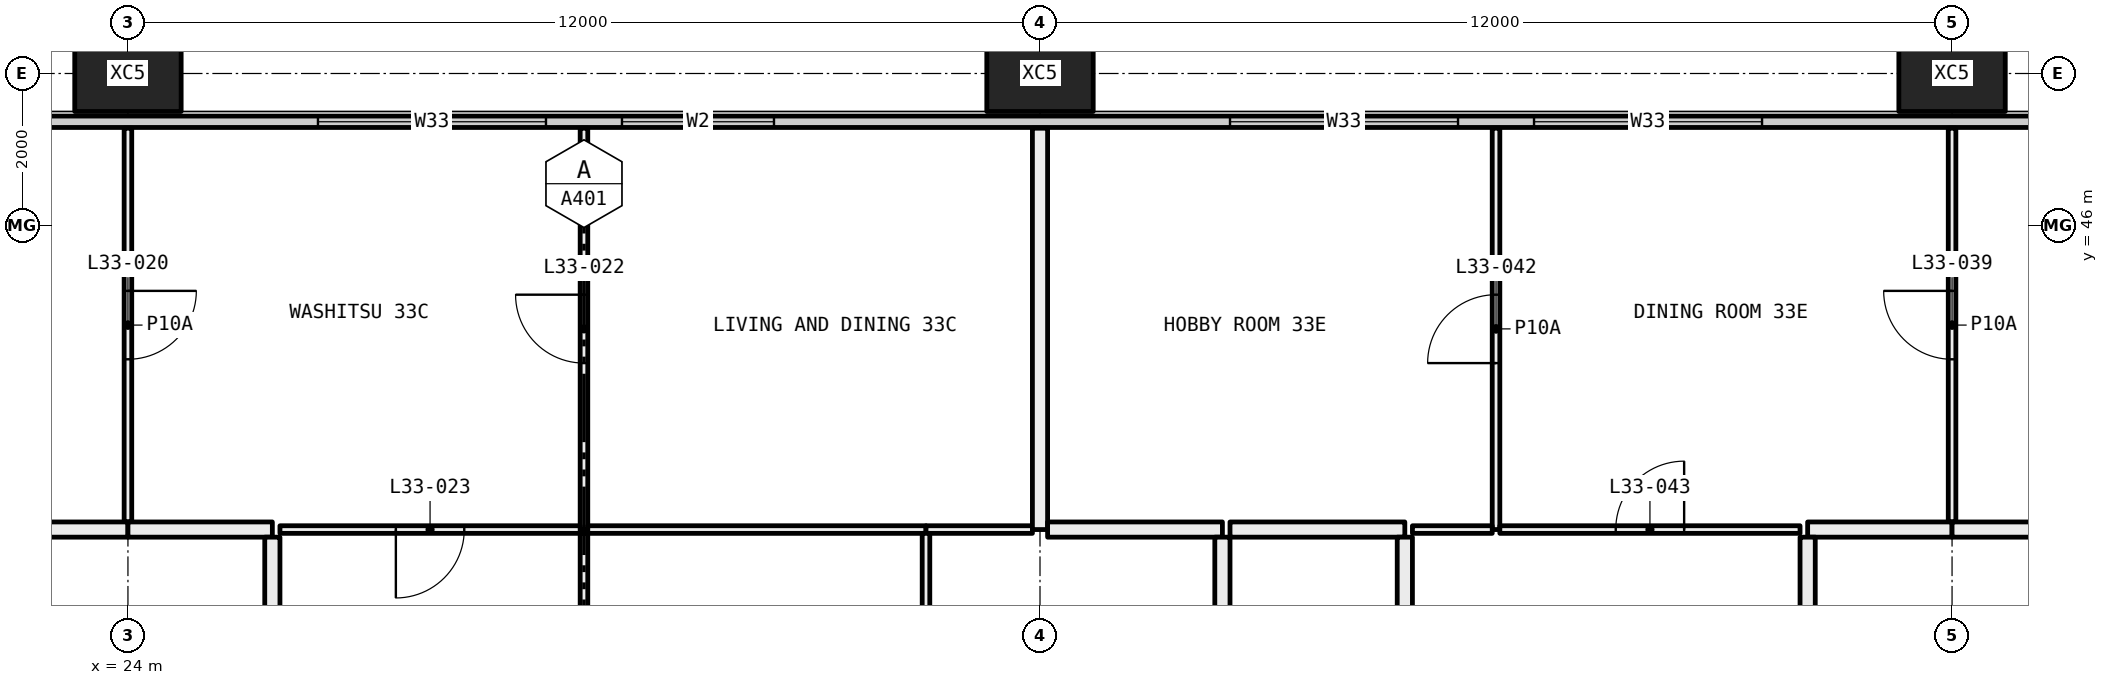
"""IFC4 building model, lengths in metres.
Left out: names, types, materials, properties, quantities, classifications, styles, units other than length and angle.
Written with IfcOpenShell. Run it as: python <this file> out.ifc"""

import sys

from ifc_helpers import new_model, si_unit, direction, frame, frame_2d, origin, origin_2d, place, context, subcontext, project, spatial, rectangle, hollow_rectangle, extrude, element, fill, save


model = new_model("IFC4")
c1 = context("Model", 3, precision=1e-05, world=origin(), true_north=direction((0.0, 1.0)))
c2 = subcontext(c1, "Body", "Model", "MODEL_VIEW")
j1 = project(units=[si_unit("LENGTHUNIT", "METRE"), si_unit("PLANEANGLEUNIT", "RADIAN")], contexts=[c1])
p1 = place(None, origin())
s1 = spatial("IfcSite", under=j1, at=p1, CompositionType="ELEMENT")
p2 = place(p1, origin())
s2 = spatial("IfcBuilding", under=s1, at=p2, CompositionType="ELEMENT")
p3 = place(p2, frame((0.0, 0.0, 127.65)))
s3 = spatial("IfcBuildingStorey", under=s2, at=p3, CompositionType="ELEMENT", Elevation=127.65)
for number, where, z_axis, x_axis in (
    (1, (24.0, 48.0, -0.4), (0.0, 0.0, 1.0), (1.0, 0.0, 0.0)),
    (2, (36.0, 48.0, -0.4), (0.0, 0.0, 1.0), (1.0, 0.0, 0.0)),
    (3, (48.0, 48.0, -0.4), (0.0, 0.0, 1.0), (1.0, 0.0, 0.0)),
):
    element("IfcColumn", number, at=place(p3, frame(where, z_axis=z_axis, x_axis=x_axis)), inside=s3, PredefinedType="COLUMN", context=c2, shape_type="SweptSolid", body=[
        extrude(hollow_rectangle(XDim=1.4, YDim=1.0, WallThickness=0.055, at=origin_2d()), origin(), (0.0, 0.0, 1.0), 3.45),
    ])
p4 = place(p3, frame((6.56, 47.365, 0.0), z_axis=(0.0, 0.0, 1.0), x_axis=(1.0, 0.0, 0.0)))
e4 = element("IfcWall", 4, at=p4, inside=s3, PredefinedType="ELEMENTEDWALL", context=c2, shape_type="SweptSolid", body=[
    extrude(rectangle(XDim=58.88, YDim=0.15, at=frame_2d((29.44, 0.0))), origin(), (0.0, 0.0, 1.0), 3.05),
])
p5 = place(p4, frame((0.44, 0.0, 0.45)))
e5 = element("IfcOpeningElement", 5, at=p5, cuts=e4, PredefinedType="OPENING", context=c2, shape_type="SweptSolid", body=[
    extrude(rectangle(XDim=4.5, YDim=2.55, at=frame_2d((2.25, 1.275))), frame((0.0, 0.085, 0.0), z_axis=(0.0, -1.0, 0.0), x_axis=(1.0, 0.0, 0.0)), (0.0, 0.0, 1.0), 0.17),
])
p6 = place(p4, frame((7.94, 0.0, 0.45)))
e6 = element("IfcOpeningElement", 6, at=p6, cuts=e4, PredefinedType="OPENING", context=c2, shape_type="SweptSolid", body=[
    extrude(rectangle(XDim=3.0, YDim=2.55, at=frame_2d((1.5, 1.275))), frame((0.0, 0.085, 0.0), z_axis=(0.0, -1.0, 0.0), x_axis=(1.0, 0.0, 0.0)), (0.0, 0.0, 1.0), 0.17),
])
p7 = place(p4, frame((11.94, 0.0, 0.45)))
e7 = element("IfcOpeningElement", 7, at=p7, cuts=e4, PredefinedType="OPENING", context=c2, shape_type="SweptSolid", body=[
    extrude(rectangle(XDim=3.0, YDim=2.55, at=frame_2d((1.5, 1.275))), frame((0.0, 0.085, 0.0), z_axis=(0.0, -1.0, 0.0), x_axis=(1.0, 0.0, 0.0)), (0.0, 0.0, 1.0), 0.17),
])
p8 = place(p4, frame((19.94, 0.0, 0.45)))
e8 = element("IfcOpeningElement", 8, at=p8, cuts=e4, PredefinedType="OPENING", context=c2, shape_type="SweptSolid", body=[
    extrude(rectangle(XDim=3.0, YDim=2.55, at=frame_2d((1.5, 1.275))), frame((0.0, 0.085, 0.0), z_axis=(0.0, -1.0, 0.0), x_axis=(1.0, 0.0, 0.0)), (0.0, 0.0, 1.0), 0.17),
])
p9 = place(p4, frame((23.94, 0.0, 0.45)))
e9 = element("IfcOpeningElement", 9, at=p9, cuts=e4, PredefinedType="OPENING", context=c2, shape_type="SweptSolid", body=[
    extrude(rectangle(XDim=2.0, YDim=2.55, at=frame_2d((1.0, 1.275))), frame((0.0, 0.085, 0.0), z_axis=(0.0, -1.0, 0.0), x_axis=(1.0, 0.0, 0.0)), (0.0, 0.0, 1.0), 0.17),
])
p10 = place(p4, frame((31.94, 0.0, 0.45)))
e10 = element("IfcOpeningElement", 10, at=p10, cuts=e4, PredefinedType="OPENING", context=c2, shape_type="SweptSolid", body=[
    extrude(rectangle(XDim=3.0, YDim=2.55, at=frame_2d((1.5, 1.275))), frame((0.0, 0.085, 0.0), z_axis=(0.0, -1.0, 0.0), x_axis=(1.0, 0.0, 0.0)), (0.0, 0.0, 1.0), 0.17),
])
p11 = place(p4, frame((35.94, 0.0, 0.45)))
e11 = element("IfcOpeningElement", 11, at=p11, cuts=e4, PredefinedType="OPENING", context=c2, shape_type="SweptSolid", body=[
    extrude(rectangle(XDim=3.0, YDim=2.55, at=frame_2d((1.5, 1.275))), frame((0.0, 0.085, 0.0), z_axis=(0.0, -1.0, 0.0), x_axis=(1.0, 0.0, 0.0)), (0.0, 0.0, 1.0), 0.17),
])
p12 = place(p4, frame((43.94, 0.0, 0.45)))
e12 = element("IfcOpeningElement", 12, at=p12, cuts=e4, PredefinedType="OPENING", context=c2, shape_type="SweptSolid", body=[
    extrude(rectangle(XDim=3.0, YDim=2.55, at=frame_2d((1.5, 1.275))), frame((0.0, 0.085, 0.0), z_axis=(0.0, -1.0, 0.0), x_axis=(1.0, 0.0, 0.0)), (0.0, 0.0, 1.0), 0.17),
])
p13 = place(p4, frame((47.94, 0.0, 0.45)))
e13 = element("IfcOpeningElement", 13, at=p13, cuts=e4, PredefinedType="OPENING", context=c2, shape_type="SweptSolid", body=[
    extrude(rectangle(XDim=2.0, YDim=2.55, at=frame_2d((1.0, 1.275))), frame((0.0, 0.085, 0.0), z_axis=(0.0, -1.0, 0.0), x_axis=(1.0, 0.0, 0.0)), (0.0, 0.0, 1.0), 0.17),
])
p14 = place(p4, frame((53.94, 0.0, 0.45)))
e14 = element("IfcOpeningElement", 14, at=p14, cuts=e4, PredefinedType="OPENING", context=c2, shape_type="SweptSolid", body=[
    extrude(rectangle(XDim=4.5, YDim=2.55, at=frame_2d((2.25, 1.275))), frame((0.0, 0.085, 0.0), z_axis=(0.0, -1.0, 0.0), x_axis=(1.0, 0.0, 0.0)), (0.0, 0.0, 1.0), 0.17),
])
p15 = place(p3, frame((24.0, 42.1, 0.0), z_axis=(0.0, 0.0, 1.0), x_axis=(0.0, 1.0, 0.0)))
e15 = element("IfcWall", 15, at=p15, inside=s3, PredefinedType="PARTITIONING", context=c2, shape_type="SweptSolid", body=[
    extrude(rectangle(XDim=5.18, YDim=0.1, at=frame_2d((2.59, 0.0))), origin(), (0.0, 0.0, 1.0), 3.05),
])
p16 = place(p15, frame((2.14, 0.0, 0.0)))
e16 = element("IfcOpeningElement", 16, at=p16, cuts=e15, PredefinedType="OPENING", context=c2, shape_type="SweptSolid", body=[
    extrude(rectangle(XDim=0.9, YDim=2.1, at=frame_2d((0.45, 1.05))), frame((0.0, 0.06, 0.0), z_axis=(0.0, -1.0, 0.0), x_axis=(1.0, 0.0, 0.0)), (0.0, 0.0, 1.0), 0.12),
])
p17 = place(p3, frame((18.0, 42.0, 0.0), z_axis=(0.0, 0.0, 1.0), x_axis=(1.0, 0.0, 0.0)))
e17 = element("IfcWall", 17, at=p17, inside=s3, PredefinedType="PARTITIONING", context=c2, shape_type="SweptSolid", body=[
    extrude(rectangle(XDim=6.0, YDim=0.2, at=frame_2d((3.0, 0.0))), origin(), (0.0, 0.0, 1.0), 3.05),
])
p18 = place(p17, frame((2.5, 0.0, 0.0)))
e18 = element("IfcOpeningElement", 18, at=p18, cuts=e17, PredefinedType="OPENING", context=c2, shape_type="SweptSolid", body=[
    extrude(rectangle(XDim=1.0, YDim=2.1, at=frame_2d((0.5, 1.05))), frame((0.0, 0.11, 0.0), z_axis=(0.0, -1.0, 0.0), x_axis=(1.0, 0.0, 0.0)), (0.0, 0.0, 1.0), 0.22),
])
p19 = place(p3, frame((30.0, 42.0, 0.0), z_axis=(0.0, 0.0, 1.0), x_axis=(0.0, 1.0, 0.0)))
e19 = element("IfcWall", 19, at=p19, inside=s3, PredefinedType="PARTITIONING", context=c2, shape_type="SweptSolid", body=[
    extrude(rectangle(XDim=5.28, YDim=0.1, at=frame_2d((2.64, 0.0))), origin(), (0.0, 0.0, 1.0), 3.05),
])
p20 = place(p19, frame((2.19, 0.0, 0.0)))
e20 = element("IfcOpeningElement", 20, at=p20, cuts=e19, PredefinedType="OPENING", context=c2, shape_type="SweptSolid", body=[
    extrude(rectangle(XDim=0.9, YDim=2.1, at=frame_2d((0.45, 1.05))), frame((0.0, 0.06, 0.0), z_axis=(0.0, -1.0, 0.0), x_axis=(1.0, 0.0, 0.0)), (0.0, 0.0, 1.0), 0.12),
])
p21 = place(p3, frame((26.0, 42.0, 0.0), z_axis=(0.0, 0.0, 1.0), x_axis=(1.0, 0.0, 0.0)))
e21 = element("IfcWall", 21, at=p21, inside=s3, PredefinedType="PARTITIONING", context=c2, shape_type="SweptSolid", body=[
    extrude(rectangle(XDim=3.95, YDim=0.1, at=frame_2d((1.975, 0.0))), origin(), (0.0, 0.0, 1.0), 3.05),
])
p22 = place(p21, frame((1.525, 0.0, 0.0)))
e22 = element("IfcOpeningElement", 22, at=p22, cuts=e21, PredefinedType="OPENING", context=c2, shape_type="SweptSolid", body=[
    extrude(rectangle(XDim=0.9, YDim=2.1, at=frame_2d((0.45, 1.05))), frame((0.0, 0.06, 0.0), z_axis=(0.0, -1.0, 0.0), x_axis=(1.0, 0.0, 0.0)), (0.0, 0.0, 1.0), 0.12),
])
p23 = place(p3, frame((24.0, 42.0, 0.0), z_axis=(0.0, 0.0, 1.0), x_axis=(1.0, 0.0, 0.0)))
e23 = element("IfcWall", 23, at=p23, inside=s3, PredefinedType="PARTITIONING", context=c2, shape_type="SweptSolid", body=[
    extrude(rectangle(XDim=1.9, YDim=0.2, at=frame_2d((0.95, 0.0))), origin(), (0.0, 0.0, 1.0), 3.05),
])
p24 = place(p3, frame((30.05, 42.0, 0.0), z_axis=(0.0, 0.0, 1.0), x_axis=(1.0, 0.0, 0.0)))
e24 = element("IfcWall", 24, at=p24, inside=s3, PredefinedType="PARTITIONING", context=c2, shape_type="SweptSolid", body=[
    extrude(rectangle(XDim=4.45, YDim=0.1, at=frame_2d((2.225, 0.0))), origin(), (0.0, 0.0, 1.0), 3.05),
])
p25 = place(p3, frame((34.5, 42.0, 0.0), z_axis=(0.0, 0.0, 1.0), x_axis=(1.0, 0.0, 0.0)))
e25 = element("IfcWall", 25, at=p25, inside=s3, PredefinedType="PARTITIONING", context=c2, shape_type="SweptSolid", body=[
    extrude(rectangle(XDim=1.4, YDim=0.1, at=frame_2d((0.7, 0.0))), origin(), (0.0, 0.0, 1.0), 3.05),
])
p26 = place(p3, frame((36.0, 42.0, 0.0), z_axis=(0.0, 0.0, 1.0), x_axis=(0.0, 1.0, 0.0)))
e26 = element("IfcWall", 26, at=p26, inside=s3, PredefinedType="PARTITIONING", context=c2, shape_type="SweptSolid", body=[
    extrude(rectangle(XDim=5.28, YDim=0.2, at=frame_2d((2.64, 0.0))), origin(), (0.0, 0.0, 1.0), 2.45),
])
p27 = place(p3, frame((30.0, 36.1, 0.0), z_axis=(0.0, 0.0, 1.0), x_axis=(0.0, 1.0, 0.0)))
e27 = element("IfcWall", 27, at=p27, inside=s3, PredefinedType="PARTITIONING", context=c2, shape_type="SweptSolid", body=[
    extrude(rectangle(XDim=5.85, YDim=0.1, at=frame_2d((2.925, 0.0))), origin(), (0.0, 0.0, 1.0), 3.05),
])
p28 = place(p27, frame((2.475, 0.0, 0.0)))
e28 = element("IfcOpeningElement", 28, at=p28, cuts=e27, PredefinedType="OPENING", context=c2, shape_type="SweptSolid", body=[
    extrude(rectangle(XDim=0.9, YDim=2.1, at=frame_2d((0.45, 1.05))), frame((0.0, 0.06, 0.0), z_axis=(0.0, -1.0, 0.0), x_axis=(1.0, 0.0, 0.0)), (0.0, 0.0, 1.0), 0.12),
])
p29 = place(p3, frame((25.9, 41.9, 0.0), z_axis=(0.0, 0.0, 1.0), x_axis=(0.0, -1.0, 0.0)))
e29 = element("IfcWall", 29, at=p29, inside=s3, PredefinedType="PARTITIONING", context=c2, shape_type="SweptSolid", body=[
    extrude(rectangle(XDim=6.2, YDim=0.2, at=frame_2d((3.1, 0.0))), origin(), (0.0, 0.0, 1.0), 2.45),
])
p30 = place(p3, frame((34.5, 36.1, 0.0), z_axis=(0.0, 0.0, 1.0), x_axis=(0.0, 1.0, 0.0)))
e30 = element("IfcWall", 30, at=p30, inside=s3, PredefinedType="PARTITIONING", context=c2, shape_type="SweptSolid", body=[
    extrude(rectangle(XDim=5.85, YDim=0.1, at=frame_2d((2.925, 0.0))), origin(), (0.0, 0.0, 1.0), 3.05),
])
p31 = place(p30, frame((2.475, 0.0, 0.0)))
e31 = element("IfcOpeningElement", 31, at=p31, cuts=e30, PredefinedType="OPENING", context=c2, shape_type="SweptSolid", body=[
    extrude(rectangle(XDim=0.9, YDim=2.1, at=frame_2d((0.45, 1.05))), frame((0.0, 0.06, 0.0), z_axis=(0.0, -1.0, 0.0), x_axis=(1.0, 0.0, 0.0)), (0.0, 0.0, 1.0), 0.12),
])
p32 = place(p3, frame((38.4, 42.0, 0.0), z_axis=(0.0, 0.0, 1.0), x_axis=(-1.0, 0.0, 0.0)))
e32 = element("IfcWall", 32, at=p32, inside=s3, PredefinedType="PARTITIONING", context=c2, shape_type="SweptSolid", body=[
    extrude(rectangle(XDim=2.3, YDim=0.2, at=frame_2d((1.15, 0.0))), origin(), (0.0, 0.0, 1.0), 3.05),
])
p33 = place(p3, frame((38.4, 36.1, 0.0), z_axis=(0.0, 0.0, 1.0), x_axis=(0.0, 1.0, 0.0)))
e33 = element("IfcWall", 33, at=p33, inside=s3, PredefinedType="PARTITIONING", context=c2, shape_type="SweptSolid", body=[
    extrude(rectangle(XDim=5.8, YDim=0.2, at=frame_2d((2.9, 0.0))), origin(), (0.0, 0.0, 1.0), 3.05),
])
p34 = place(p3, frame((42.0, 42.0, 0.0), z_axis=(0.0, 0.0, 1.0), x_axis=(0.0, 1.0, 0.0)))
e34 = element("IfcWall", 34, at=p34, inside=s3, PredefinedType="PARTITIONING", context=c2, shape_type="SweptSolid", body=[
    extrude(rectangle(XDim=5.28, YDim=0.1, at=frame_2d((2.64, 0.0))), origin(), (0.0, 0.0, 1.0), 3.05),
])
p35 = place(p34, frame((2.19, 0.0, 0.0)))
e35 = element("IfcOpeningElement", 35, at=p35, cuts=e34, PredefinedType="OPENING", context=c2, shape_type="SweptSolid", body=[
    extrude(rectangle(XDim=0.9, YDim=2.1, at=frame_2d((0.45, 1.05))), frame((0.0, 0.06, 0.0), z_axis=(0.0, -1.0, 0.0), x_axis=(1.0, 0.0, 0.0)), (0.0, 0.0, 1.0), 0.12),
])
p36 = place(p3, frame((40.9, 42.0, 0.0), z_axis=(0.0, 0.0, 1.0), x_axis=(1.0, 0.0, 0.0)))
e36 = element("IfcWall", 36, at=p36, inside=s3, PredefinedType="PARTITIONING", context=c2, shape_type="SweptSolid", body=[
    extrude(rectangle(XDim=1.05, YDim=0.1, at=frame_2d((0.525, 0.0))), origin(), (0.0, 0.0, 1.0), 3.05),
])
p37 = place(p3, frame((38.5, 42.0, 0.0), z_axis=(0.0, 0.0, 1.0), x_axis=(1.0, 0.0, 0.0)))
e37 = element("IfcWall", 37, at=p37, inside=s3, PredefinedType="PARTITIONING", context=c2, shape_type="SweptSolid", body=[
    extrude(rectangle(XDim=2.3, YDim=0.2, at=frame_2d((1.15, 0.0))), origin(), (0.0, 0.0, 1.0), 3.05),
])
p38 = place(p3, frame((48.0, 42.1, 0.0), z_axis=(0.0, 0.0, 1.0), x_axis=(0.0, 1.0, 0.0)))
e38 = element("IfcWall", 38, at=p38, inside=s3, PredefinedType="PARTITIONING", context=c2, shape_type="SweptSolid", body=[
    extrude(rectangle(XDim=5.18, YDim=0.1, at=frame_2d((2.59, 0.0))), origin(), (0.0, 0.0, 1.0), 3.05),
])
p39 = place(p38, frame((2.14, 0.0, 0.0)))
e39 = element("IfcOpeningElement", 39, at=p39, cuts=e38, PredefinedType="OPENING", context=c2, shape_type="SweptSolid", body=[
    extrude(rectangle(XDim=0.9, YDim=2.1, at=frame_2d((0.45, 1.05))), frame((0.0, 0.06, 0.0), z_axis=(0.0, -1.0, 0.0), x_axis=(1.0, 0.0, 0.0)), (0.0, 0.0, 1.0), 0.12),
])
p40 = place(p3, frame((42.05, 42.0, 0.0), z_axis=(0.0, 0.0, 1.0), x_axis=(1.0, 0.0, 0.0)))
e40 = element("IfcWall", 40, at=p40, inside=s3, PredefinedType="PARTITIONING", context=c2, shape_type="SweptSolid", body=[
    extrude(rectangle(XDim=3.95, YDim=0.1, at=frame_2d((1.975, 0.0))), origin(), (0.0, 0.0, 1.0), 3.05),
])
p41 = place(p40, frame((1.525, 0.0, 0.0)))
e41 = element("IfcOpeningElement", 41, at=p41, cuts=e40, PredefinedType="OPENING", context=c2, shape_type="SweptSolid", body=[
    extrude(rectangle(XDim=0.9, YDim=2.1, at=frame_2d((0.45, 1.05))), frame((0.0, 0.06, 0.0), z_axis=(0.0, -1.0, 0.0), x_axis=(1.0, 0.0, 0.0)), (0.0, 0.0, 1.0), 0.12),
])
p42 = place(p3, frame((46.1, 42.0, 0.0), z_axis=(0.0, 0.0, 1.0), x_axis=(1.0, 0.0, 0.0)))
e42 = element("IfcWall", 42, at=p42, inside=s3, PredefinedType="PARTITIONING", context=c2, shape_type="SweptSolid", body=[
    extrude(rectangle(XDim=1.9, YDim=0.2, at=frame_2d((0.95, 0.0))), origin(), (0.0, 0.0, 1.0), 3.05),
])
p43 = place(p3, frame((48.0, 42.0, 0.0), z_axis=(0.0, 0.0, 1.0), x_axis=(1.0, 0.0, 0.0)))
e43 = element("IfcWall", 43, at=p43, inside=s3, PredefinedType="PARTITIONING", context=c2, shape_type="SweptSolid", body=[
    extrude(rectangle(XDim=6.0, YDim=0.2, at=frame_2d((3.0, 0.0))), origin(), (0.0, 0.0, 1.0), 3.05),
])
p44 = place(p43, frame((2.5, 0.0, 0.0)))
e44 = element("IfcOpeningElement", 44, at=p44, cuts=e43, PredefinedType="OPENING", context=c2, shape_type="SweptSolid", body=[
    extrude(rectangle(XDim=1.0, YDim=2.1, at=frame_2d((0.5, 1.05))), frame((0.0, 0.11, 0.0), z_axis=(0.0, -1.0, 0.0), x_axis=(1.0, 0.0, 0.0)), (0.0, 0.0, 1.0), 0.22),
])
p45 = place(p3, frame((40.8, 41.9, 0.0), z_axis=(0.0, 0.0, 1.0), x_axis=(0.0, -1.0, 0.0)))
e45 = element("IfcWall", 45, at=p45, inside=s3, PredefinedType="PARTITIONING", context=c2, shape_type="SweptSolid", body=[
    extrude(rectangle(XDim=6.2, YDim=0.2, at=frame_2d((3.1, 0.0))), origin(), (0.0, 0.0, 1.0), 2.45),
])
p46 = place(p3, frame((46.1, 36.1, 0.0), z_axis=(0.0, 0.0, 1.0), x_axis=(0.0, 1.0, 0.0)))
e46 = element("IfcWall", 46, at=p46, inside=s3, PredefinedType="PARTITIONING", context=c2, shape_type="SweptSolid", body=[
    extrude(rectangle(XDim=5.8, YDim=0.2, at=frame_2d((2.9, 0.0))), origin(), (0.0, 0.0, 1.0), 3.05),
])
p47 = place(p8, origin())
e47 = element("IfcWindow", 47, at=p47, inside=s3, PartitioningType="SINGLE_PANEL", PredefinedType="WINDOW", context=c2, shape_type="SweptSolid", body=[
    extrude(rectangle(XDim=3.0, YDim=2.55, at=frame_2d((1.5, 1.275))), frame((0.0, 0.03, 0.0), z_axis=(0.0, -1.0, 0.0), x_axis=(1.0, 0.0, 0.0)), (0.0, 0.0, 1.0), 0.06),
])
fill(e8, e47)
p48 = place(p9, origin())
e48 = element("IfcWindow", 48, at=p48, inside=s3, PartitioningType="SINGLE_PANEL", PredefinedType="WINDOW", context=c2, shape_type="SweptSolid", body=[
    extrude(rectangle(XDim=2.0, YDim=2.55, at=frame_2d((1.0, 1.275))), frame((0.0, 0.03, 0.0), z_axis=(0.0, -1.0, 0.0), x_axis=(1.0, 0.0, 0.0)), (0.0, 0.0, 1.0), 0.06),
])
fill(e9, e48)
p49 = place(p10, origin())
e49 = element("IfcWindow", 49, at=p49, inside=s3, PartitioningType="SINGLE_PANEL", PredefinedType="WINDOW", context=c2, shape_type="SweptSolid", body=[
    extrude(rectangle(XDim=3.0, YDim=2.55, at=frame_2d((1.5, 1.275))), frame((0.0, 0.03, 0.0), z_axis=(0.0, -1.0, 0.0), x_axis=(1.0, 0.0, 0.0)), (0.0, 0.0, 1.0), 0.06),
])
fill(e10, e49)
p50 = place(p11, origin())
e50 = element("IfcWindow", 50, at=p50, inside=s3, PartitioningType="SINGLE_PANEL", PredefinedType="WINDOW", context=c2, shape_type="SweptSolid", body=[
    extrude(rectangle(XDim=3.0, YDim=2.55, at=frame_2d((1.5, 1.275))), frame((0.0, 0.03, 0.0), z_axis=(0.0, -1.0, 0.0), x_axis=(1.0, 0.0, 0.0)), (0.0, 0.0, 1.0), 0.06),
])
fill(e11, e50)
p51 = place(p16, frame((0.9, 0.0, 0.0), x_axis=(-1.0, 0.0, 0.0)))
e51 = element("IfcDoor", 51, at=p51, inside=s3, OperationType="SINGLE_SWING_RIGHT", PredefinedType="DOOR", context=c2, shape_type="SweptSolid", body=[
    extrude(rectangle(XDim=0.9, YDim=2.1, at=frame_2d((0.45, 1.05))), frame((0.0, 0.025, 0.0), z_axis=(0.0, -1.0, 0.0), x_axis=(1.0, 0.0, 0.0)), (0.0, 0.0, 1.0), 0.05),
])
fill(e16, e51)
p52 = place(p20, origin())
e52 = element("IfcDoor", 52, at=p52, inside=s3, OperationType="SINGLE_SWING_LEFT", PredefinedType="DOOR", context=c2, shape_type="SweptSolid", body=[
    extrude(rectangle(XDim=0.9, YDim=2.1, at=frame_2d((0.45, 1.05))), frame((0.0, 0.025, 0.0), z_axis=(0.0, -1.0, 0.0), x_axis=(1.0, 0.0, 0.0)), (0.0, 0.0, 1.0), 0.05),
])
fill(e20, e52)
p53 = place(p22, frame((0.9, 0.0, 0.0), x_axis=(-1.0, 0.0, 0.0)))
e53 = element("IfcDoor", 53, at=p53, inside=s3, OperationType="SINGLE_SWING_LEFT", PredefinedType="DOOR", context=c2, shape_type="SweptSolid", body=[
    extrude(rectangle(XDim=0.9, YDim=2.1, at=frame_2d((0.45, 1.05))), frame((0.0, 0.025, 0.0), z_axis=(0.0, -1.0, 0.0), x_axis=(1.0, 0.0, 0.0)), (0.0, 0.0, 1.0), 0.05),
])
fill(e22, e53)
p54 = place(p39, origin())
e54 = element("IfcDoor", 54, at=p54, inside=s3, OperationType="SINGLE_SWING_LEFT", PredefinedType="DOOR", context=c2, shape_type="SweptSolid", body=[
    extrude(rectangle(XDim=0.9, YDim=2.1, at=frame_2d((0.45, 1.05))), frame((0.0, 0.025, 0.0), z_axis=(0.0, -1.0, 0.0), x_axis=(1.0, 0.0, 0.0)), (0.0, 0.0, 1.0), 0.05),
])
fill(e39, e54)
p55 = place(p35, origin())
e55 = element("IfcDoor", 55, at=p55, inside=s3, OperationType="SINGLE_SWING_RIGHT", PredefinedType="DOOR", context=c2, shape_type="SweptSolid", body=[
    extrude(rectangle(XDim=0.9, YDim=2.1, at=frame_2d((0.45, 1.05))), frame((0.0, 0.025, 0.0), z_axis=(0.0, -1.0, 0.0), x_axis=(1.0, 0.0, 0.0)), (0.0, 0.0, 1.0), 0.05),
])
fill(e35, e55)
p56 = place(p41, origin())
e56 = element("IfcDoor", 56, at=p56, inside=s3, OperationType="SINGLE_SWING_LEFT", PredefinedType="DOOR", context=c2, shape_type="SweptSolid", body=[
    extrude(rectangle(XDim=0.9, YDim=2.1, at=frame_2d((0.45, 1.05))), frame((0.0, 0.025, 0.0), z_axis=(0.0, -1.0, 0.0), x_axis=(1.0, 0.0, 0.0)), (0.0, 0.0, 1.0), 0.05),
])
fill(e41, e56)
save(model, sys.argv[1])
